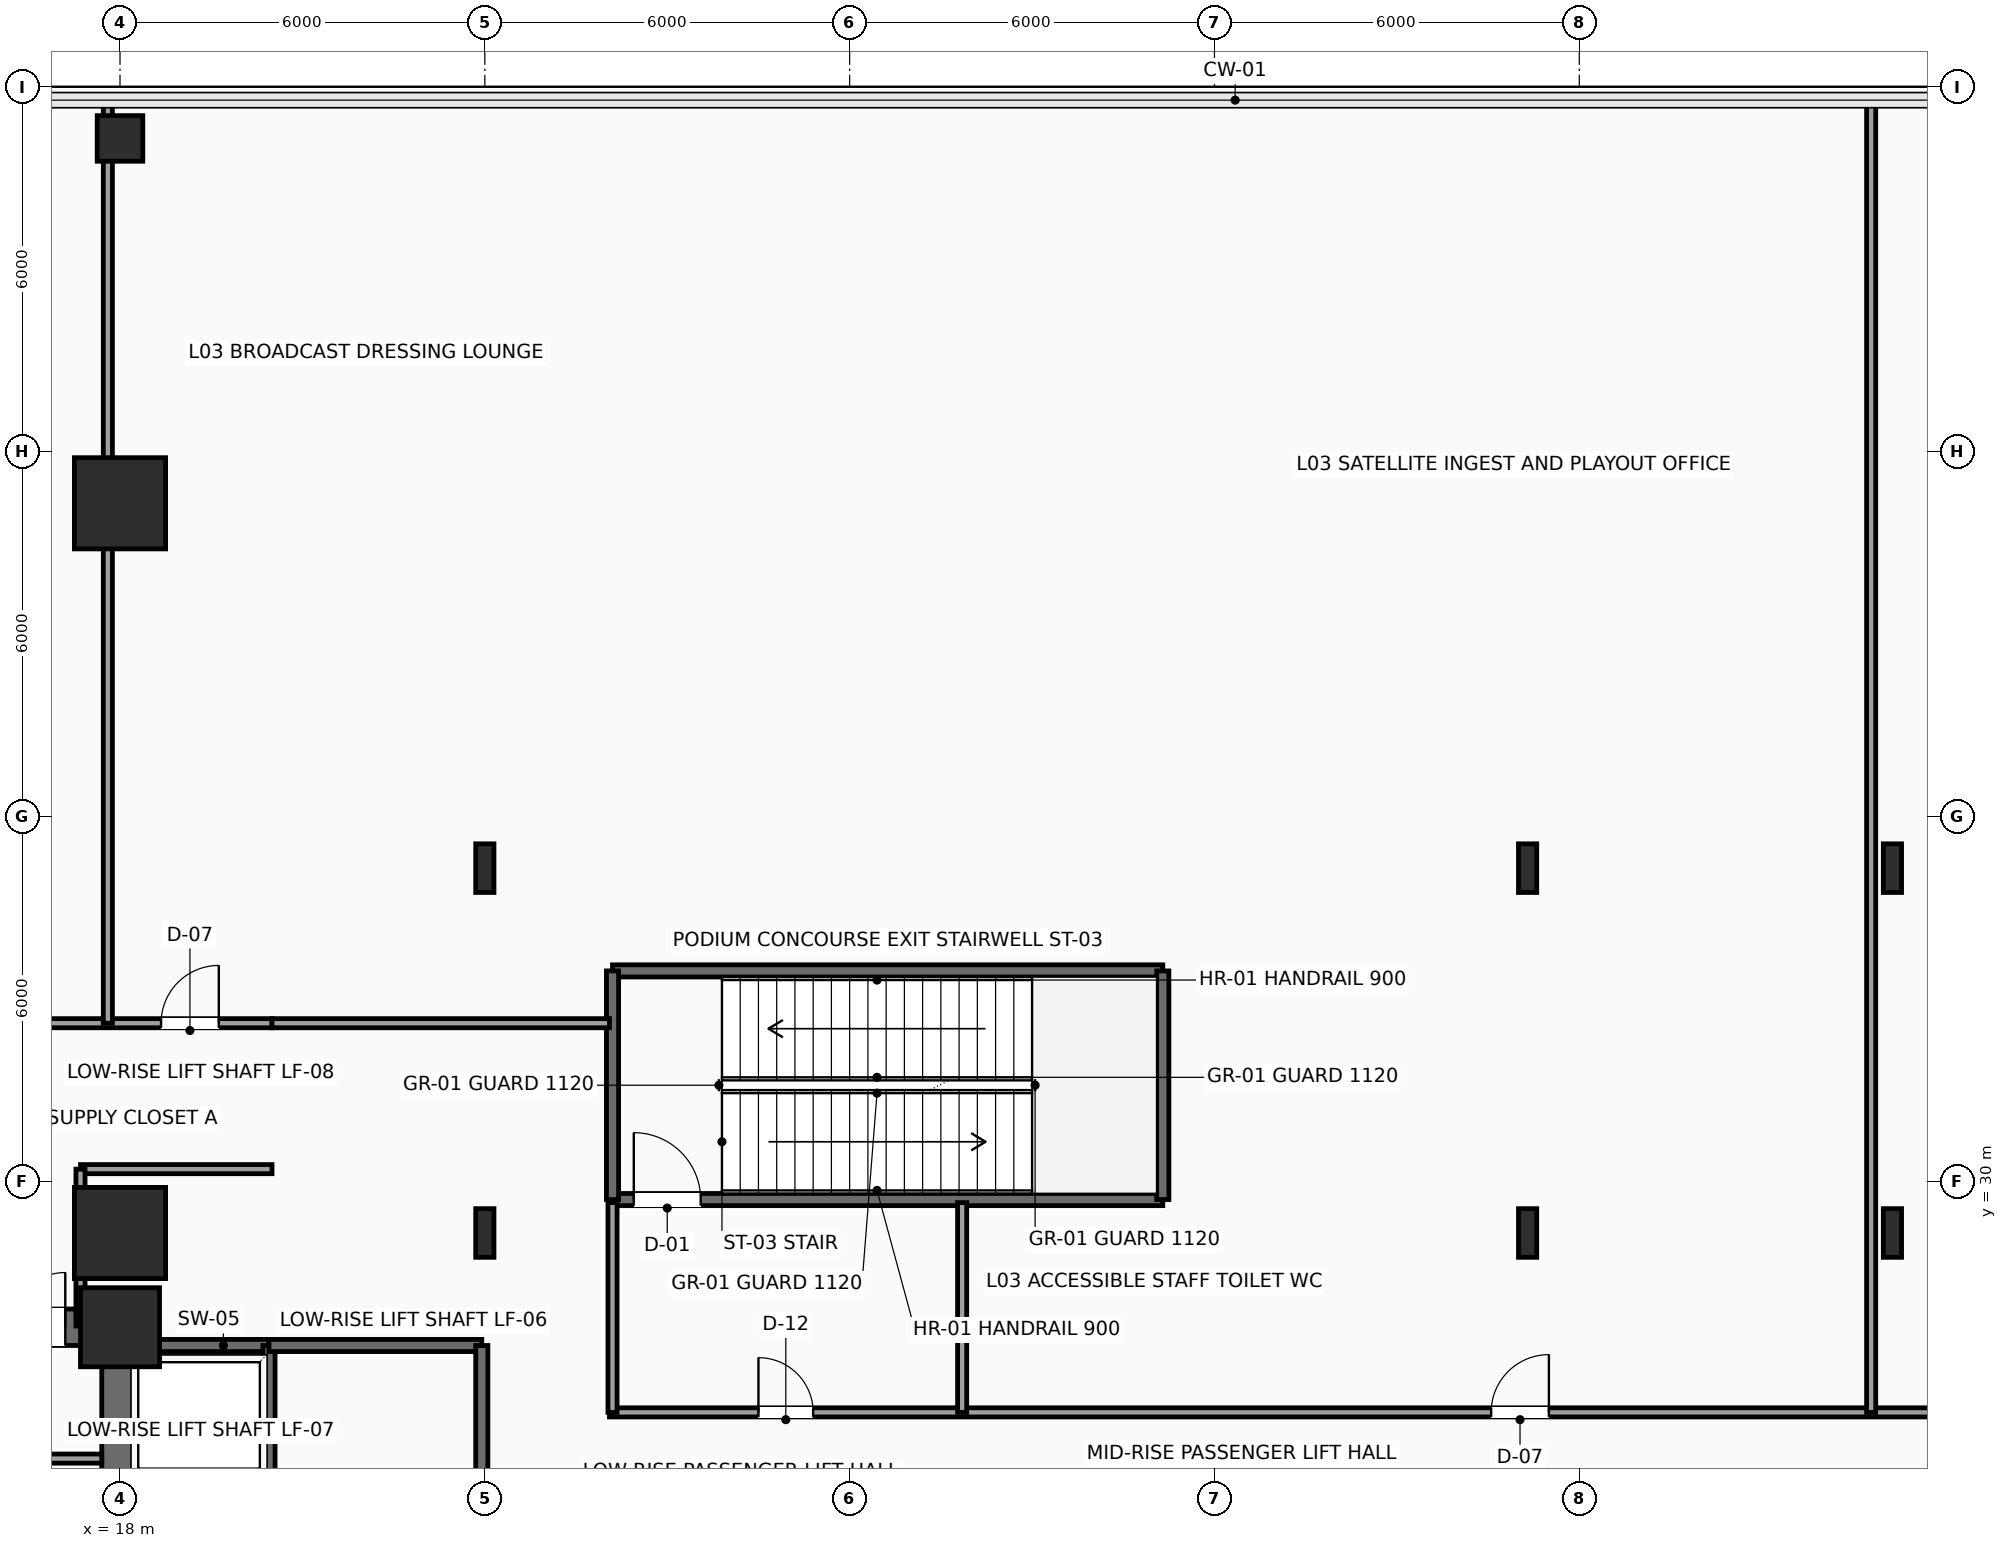
"""IFC4 building model, lengths in metres.
Left out: names, types, materials, properties, quantities, classifications, styles, units other than length and angle.
Written with IfcOpenShell. Run it as: python <this file> out.ifc"""

import sys

from ifc_helpers import new_model, si_unit, direction, frame, frame_2d, origin, origin_2d, place, context, subcontext, project, spatial, rectangle, hollow_rectangle, i_section, extrude, element, fill, save


model = new_model("IFC4")
c1 = context("Model", 3, precision=1e-05, world=origin(), true_north=direction((0.0, 1.0)))
c2 = subcontext(c1, "Body", "Model", "MODEL_VIEW")
j1 = project(units=[si_unit("LENGTHUNIT", "METRE"), si_unit("PLANEANGLEUNIT", "RADIAN")], contexts=[c1])
p1 = place(None, origin())
s1 = spatial("IfcSite", under=j1, at=p1, CompositionType="ELEMENT")
p2 = place(p1, origin())
s2 = spatial("IfcBuilding", under=s1, at=p2, CompositionType="ELEMENT")
p3 = place(p2, frame((0.0, 0.0, 16.5)))
s3 = spatial("IfcBuildingStorey", under=s2, at=p3, CompositionType="ELEMENT", Elevation=16.5)
p4 = place(p3, frame((18.0, 27.6, 0.0), z_axis=(0.0, 0.0, 1.0), x_axis=(1.0, 0.0, 0.0)))
e1 = element("IfcColumn", 1, at=p4, inside=s3, PredefinedType="COLUMN", context=c2, shape_type="SweptSolid", body=[
    extrude(rectangle(XDim=1.3, YDim=1.3, at=origin_2d()), origin(), (0.0, 0.0, 1.0), 5.4),
])
for number, where, z_axis, x_axis in (
    (2, (18.0, 29.15, 0.0), (0.0, 0.0, 1.0), (1.0, 0.0, 0.0)),
    (3, (18.0, 41.15, 0.0), (0.0, 0.0, 1.0), (1.0, 0.0, 0.0)),
):
    element("IfcColumn", number, at=place(p3, frame(where, z_axis=z_axis, x_axis=x_axis)), inside=s3, PredefinedType="COLUMN", context=c2, shape_type="SweptSolid", body=[
        extrude(rectangle(XDim=1.5, YDim=1.5, at=origin_2d()), origin(), (0.0, 0.0, 1.0), 5.4),
    ])
p5 = place(p3, frame((18.0, 47.15, 0.0), z_axis=(0.0, 0.0, 1.0), x_axis=(1.0, 0.0, 0.0)))
e4 = element("IfcColumn", 4, at=p5, inside=s3, PredefinedType="COLUMN", context=c2, shape_type="SweptSolid", body=[
    extrude(hollow_rectangle(XDim=0.75, YDim=0.75, WallThickness=0.035, InnerFilletRadius=0.035, OuterFilletRadius=0.05, at=origin_2d()), origin(), (0.0, 0.0, 1.0), 5.4),
])
for number, where, z_axis, x_axis in (
    (5, (24.0, 29.15, 0.0), (0.0, 0.0, 1.0), (1.0, 0.0, 0.0)),
    (6, (24.0, 35.15, 0.0), (0.0, 0.0, 1.0), (1.0, 0.0, 0.0)),
    (7, (41.15, 29.15, 0.0), (0.0, 0.0, 1.0), (1.0, 0.0, 0.0)),
    (8, (41.15, 35.15, 0.0), (0.0, 0.0, 1.0), (1.0, 0.0, 0.0)),
    (9, (47.15, 29.15, 0.0), (0.0, 0.0, 1.0), (1.0, 0.0, 0.0)),
    (10, (47.15, 35.15, 0.0), (0.0, 0.0, 1.0), (1.0, 0.0, 0.0)),
):
    element("IfcColumn", number, at=place(p3, frame(where, z_axis=z_axis, x_axis=x_axis)), inside=s3, PredefinedType="COLUMN", context=c2, shape_type="SweptSolid", body=[
        extrude(i_section(OverallWidth=0.3, OverallDepth=0.8, WebThickness=0.018, FlangeThickness=0.033, FilletRadius=0.03, at=origin_2d()), origin(), (0.0, 0.0, 1.0), 5.4),
    ])
p6 = place(p3, frame((6.0, 27.6, 0.0), z_axis=(0.0, 0.0, 1.0), x_axis=(1.0, 0.0, 0.0)))
e11 = element("IfcWall", 11, at=p6, inside=s3, PredefinedType="SHEAR", context=c2, shape_type="SweptSolid", body=[
    extrude(rectangle(XDim=12.0, YDim=0.6, at=frame_2d((6.0, 0.0))), origin(), (0.0, 0.0, 1.0), 5.125),
])
p7 = place(p6, frame((10.2, 0.0, 0.0)))
e12 = element("IfcOpeningElement", 12, at=p7, cuts=e11, PredefinedType="OPENING", context=c2, shape_type="SweptSolid", body=[
    extrude(rectangle(XDim=0.9, YDim=2.15, at=frame_2d((0.45, 1.075))), frame((0.0, 0.31, 0.0), z_axis=(0.0, -1.0, 0.0), x_axis=(1.0, 0.0, 0.0)), (0.0, 0.0, 1.0), 0.62),
])
p8 = place(p3, frame((18.0, 18.0, 0.0), z_axis=(0.0, 0.0, 1.0), x_axis=(0.0, 1.0, 0.0)))
e13 = element("IfcWall", 13, at=p8, inside=s3, PredefinedType="SHEAR", context=c2, shape_type="SweptSolid", body=[
    extrude(rectangle(XDim=9.6, YDim=0.6, at=frame_2d((4.8, 0.0))), origin(), (0.0, 0.0, 1.0), 5.125),
])
p9 = place(p3, frame((15.28, 25.44, 0.0), z_axis=(0.0, 0.0, 1.0), x_axis=(1.0, 0.0, 0.0)))
e14 = element("IfcWall", 14, at=p9, inside=s3, PredefinedType="PARTITIONING", context=c2, shape_type="SweptSolid", body=[
    extrude(rectangle(XDim=2.42, YDim=0.15, at=frame_2d((1.21, 0.0))), origin(), (0.0, 0.0, 1.0), 5.125),
])
p10 = place(p9, frame((0.65, 0.0, 0.0)))
e15 = element("IfcOpeningElement", 15, at=p10, cuts=e14, PredefinedType="OPENING", context=c2, shape_type="SweptSolid", body=[
    extrude(rectangle(XDim=0.9, YDim=2.15, at=frame_2d((0.45, 1.075))), frame((0.0, 0.085, 0.0), z_axis=(0.0, -1.0, 0.0), x_axis=(1.0, 0.0, 0.0)), (0.0, 0.0, 1.0), 0.17),
])
p11 = place(p3, frame((18.1, 27.3, 0.0), z_axis=(0.0, 0.0, 1.0), x_axis=(1.0, 0.0, 0.0)))
e16 = element("IfcWall", 16, at=p11, inside=s3, PredefinedType="SHEAR", context=c2, shape_type="SweptSolid", body=[
    extrude(rectangle(XDim=2.35, YDim=0.2, at=frame_2d((1.175, 0.0))), origin(), (0.0, 0.0, 1.0), 5.125),
])
p12 = place(p3, frame((20.45, 18.25, 0.0), z_axis=(0.0, 0.0, 1.0), x_axis=(0.0, 1.0, 0.0)))
e17 = element("IfcWall", 17, at=p12, inside=s3, PredefinedType="SHEAR", context=c2, shape_type="SweptSolid", body=[
    extrude(rectangle(XDim=9.05, YDim=0.2, at=frame_2d((4.525, 0.0))), origin(), (0.0, 0.0, 1.0), 5.125),
])
p13 = place(p3, frame((20.45, 27.3, 0.0), z_axis=(0.0, 0.0, 1.0), x_axis=(1.0, 0.0, 0.0)))
e18 = element("IfcWall", 18, at=p13, inside=s3, PredefinedType="SHEAR", context=c2, shape_type="SweptSolid", body=[
    extrude(rectangle(XDim=3.5, YDim=0.2, at=frame_2d((1.75, 0.0))), origin(), (0.0, 0.0, 1.0), 5.125),
])
p14 = place(p3, frame((23.95, 18.0, 0.0), z_axis=(0.0, 0.0, 1.0), x_axis=(0.0, 1.0, 0.0)))
e19 = element("IfcWall", 19, at=p14, inside=s3, PredefinedType="SHEAR", context=c2, shape_type="SweptSolid", body=[
    extrude(rectangle(XDim=9.3, YDim=0.2, at=frame_2d((4.65, 0.0))), origin(), (0.0, 0.0, 1.0), 5.125),
])
p15 = place(p3, frame((26.1, 29.7, 0.0), z_axis=(0.0, 0.0, 1.0), x_axis=(1.0, 0.0, 0.0)))
e20 = element("IfcWall", 20, at=p15, inside=s3, PredefinedType="SHEAR", context=c2, shape_type="SweptSolid", body=[
    extrude(rectangle(XDim=9.05, YDim=0.2, at=frame_2d((4.525, 0.0))), origin(), (0.0, 0.0, 1.0), 5.125),
])
p16 = place(p15, frame((0.35, 0.0, 0.0)))
e21 = element("IfcOpeningElement", 21, at=p16, cuts=e20, PredefinedType="OPENING", context=c2, shape_type="SweptSolid", body=[
    extrude(rectangle(XDim=1.1, YDim=2.2, at=frame_2d((0.55, 1.1))), frame((0.0, 0.11, 0.0), z_axis=(0.0, -1.0, 0.0), x_axis=(1.0, 0.0, 0.0)), (0.0, 0.0, 1.0), 0.22),
])
p17 = place(p3, frame((26.1, 33.46, 0.0), z_axis=(0.0, 0.0, 1.0), x_axis=(1.0, 0.0, 0.0)))
e22 = element("IfcWall", 22, at=p17, inside=s3, PredefinedType="SHEAR", context=c2, shape_type="SweptSolid", body=[
    extrude(rectangle(XDim=9.05, YDim=0.2, at=frame_2d((4.525, 0.0))), origin(), (0.0, 0.0, 1.0), 5.125),
])
for number, where, z_axis, x_axis in (
    (23, (26.1, 29.7, 0.0), (0.0, 0.0, 1.0), (0.0, 1.0, 0.0)),
    (24, (35.15, 29.7, 0.0), (0.0, 0.0, 1.0), (0.0, 1.0, 0.0)),
):
    element("IfcWall", number, at=place(p3, frame(where, z_axis=z_axis, x_axis=x_axis)), inside=s3, PredefinedType="SHEAR", context=c2, shape_type="SweptSolid", body=[
        extrude(rectangle(XDim=3.76, YDim=0.2, at=frame_2d((1.88, 0.0))), origin(), (0.0, 0.0, 1.0), 5.125),
    ])
p18 = place(p3, frame((20.5, 30.2, 0.0), z_axis=(0.0, 0.0, 1.0), x_axis=(-1.0, 0.0, 0.0)))
e25 = element("IfcWall", 25, at=p18, inside=s3, PredefinedType="PARTITIONING", context=c2, shape_type="SweptSolid", body=[
    extrude(rectangle(XDim=3.15, YDim=0.15, at=frame_2d((1.575, 0.0))), origin(), (0.0, 0.0, 1.0), 5.125),
])
p19 = place(p3, frame((17.35, 30.2, 0.0), z_axis=(0.0, 0.0, 1.0), x_axis=(0.0, -1.0, 0.0)))
e26 = element("IfcWall", 26, at=p19, inside=s3, PredefinedType="PARTITIONING", context=c2, shape_type="SweptSolid", body=[
    extrude(rectangle(XDim=2.58, YDim=0.15, at=frame_2d((1.29, 0.0))), origin(), (0.0, 0.0, 1.0), 5.125),
])
p20 = place(p3, frame((5.9, 32.6, 0.0), z_axis=(0.0, 0.0, 1.0), x_axis=(1.0, 0.0, 0.0)))
e27 = element("IfcWall", 27, at=p20, inside=s3, PredefinedType="PARTITIONING", context=c2, shape_type="SweptSolid", body=[
    extrude(rectangle(XDim=14.6, YDim=0.15, at=frame_2d((7.3, 0.0))), origin(), (0.0, 0.0, 1.0), 5.125),
])
p21 = place(p20, frame((1.175, 0.0, 0.0)))
e28 = element("IfcOpeningElement", 28, at=p21, cuts=e27, PredefinedType="OPENING", context=c2, shape_type="SweptSolid", body=[
    extrude(rectangle(XDim=0.95, YDim=2.15, at=frame_2d((0.475, 1.075))), frame((0.0, 0.085, 0.0), z_axis=(0.0, -1.0, 0.0), x_axis=(1.0, 0.0, 0.0)), (0.0, 0.0, 1.0), 0.17),
])
p22 = place(p20, frame((7.125, 0.0, 0.0)))
e29 = element("IfcOpeningElement", 29, at=p22, cuts=e27, PredefinedType="OPENING", context=c2, shape_type="SweptSolid", body=[
    extrude(rectangle(XDim=0.95, YDim=2.15, at=frame_2d((0.475, 1.075))), frame((0.0, 0.085, 0.0), z_axis=(0.0, -1.0, 0.0), x_axis=(1.0, 0.0, 0.0)), (0.0, 0.0, 1.0), 0.17),
])
p23 = place(p20, frame((12.775, 0.0, 0.0)))
e30 = element("IfcOpeningElement", 30, at=p23, cuts=e27, PredefinedType="OPENING", context=c2, shape_type="SweptSolid", body=[
    extrude(rectangle(XDim=0.95, YDim=2.15, at=frame_2d((0.475, 1.075))), frame((0.0, 0.085, 0.0), z_axis=(0.0, -1.0, 0.0), x_axis=(1.0, 0.0, 0.0)), (0.0, 0.0, 1.0), 0.17),
])
p24 = place(p3, frame((20.5, 32.6, 0.0), z_axis=(0.0, 0.0, 1.0), x_axis=(1.0, 0.0, 0.0)))
e31 = element("IfcWall", 31, at=p24, inside=s3, PredefinedType="PARTITIONING", context=c2, shape_type="SweptSolid", body=[
    extrude(rectangle(XDim=5.55, YDim=0.15, at=frame_2d((2.775, 0.0))), origin(), (0.0, 0.0, 1.0), 5.125),
])
p25 = place(p3, frame((26.05, 26.2, 0.0), z_axis=(0.0, 0.0, 1.0), x_axis=(1.0, 0.0, 0.0)))
e32 = element("IfcWall", 32, at=p25, inside=s3, PredefinedType="PARTITIONING", context=c2, shape_type="SweptSolid", body=[
    extrude(rectangle(XDim=33.55, YDim=0.15, at=frame_2d((16.775, 0.0))), origin(), (0.0, 0.0, 1.0), 5.125),
])
p26 = place(p25, frame((2.45, 0.0, 0.0)))
e33 = element("IfcOpeningElement", 33, at=p26, cuts=e32, PredefinedType="OPENING", context=c2, shape_type="SweptSolid", body=[
    extrude(rectangle(XDim=0.9, YDim=2.1, at=frame_2d((0.45, 1.05))), frame((0.0, 0.085, 0.0), z_axis=(0.0, -1.0, 0.0), x_axis=(1.0, 0.0, 0.0)), (0.0, 0.0, 1.0), 0.17),
])
p27 = place(p25, frame((14.5, 0.0, 0.0)))
e34 = element("IfcOpeningElement", 34, at=p27, cuts=e32, PredefinedType="OPENING", context=c2, shape_type="SweptSolid", body=[
    extrude(rectangle(XDim=0.95, YDim=2.15, at=frame_2d((0.475, 1.075))), frame((0.0, 0.085, 0.0), z_axis=(0.0, -1.0, 0.0), x_axis=(1.0, 0.0, 0.0)), (0.0, 0.0, 1.0), 0.17),
])
p28 = place(p25, frame((24.275, 0.0, 0.0)))
e35 = element("IfcOpeningElement", 35, at=p28, cuts=e32, PredefinedType="OPENING", context=c2, shape_type="SweptSolid", body=[
    extrude(rectangle(XDim=0.95, YDim=2.15, at=frame_2d((0.475, 1.075))), frame((0.0, 0.085, 0.0), z_axis=(0.0, -1.0, 0.0), x_axis=(1.0, 0.0, 0.0)), (0.0, 0.0, 1.0), 0.17),
])
p29 = place(p25, frame((30.675, 0.0, 0.0)))
e36 = element("IfcOpeningElement", 36, at=p29, cuts=e32, PredefinedType="OPENING", context=c2, shape_type="SweptSolid", body=[
    extrude(rectangle(XDim=0.95, YDim=2.15, at=frame_2d((0.475, 1.075))), frame((0.0, 0.085, 0.0), z_axis=(0.0, -1.0, 0.0), x_axis=(1.0, 0.0, 0.0)), (0.0, 0.0, 1.0), 0.17),
])
for number, where, z_axis, x_axis in (
    (37, (26.1, 26.2, 0.0), (0.0, 0.0, 1.0), (0.0, 1.0, 0.0)),
    (38, (31.85, 26.2, 0.0), (0.0, 0.0, 1.0), (0.0, 1.0, 0.0)),
):
    element("IfcWall", number, at=place(p3, frame(where, z_axis=z_axis, x_axis=x_axis)), inside=s3, PredefinedType="PARTITIONING", context=c2, shape_type="SweptSolid", body=[
        extrude(rectangle(XDim=3.45, YDim=0.15, at=frame_2d((1.725, 0.0))), origin(), (0.0, 0.0, 1.0), 5.125),
    ])
p30 = place(p3, frame((46.8, 26.2, 0.0), z_axis=(0.0, 0.0, 1.0), x_axis=(0.0, 1.0, 0.0)))
e39 = element("IfcWall", 39, at=p30, inside=s3, PredefinedType="PARTITIONING", context=c2, shape_type="SweptSolid", body=[
    extrude(rectangle(XDim=21.58, YDim=0.15, at=frame_2d((10.79, 0.0))), origin(), (0.0, 0.0, 1.0), 5.125),
])
p31 = place(p3, frame((17.8, 32.6, 0.0), z_axis=(0.0, 0.0, 1.0), x_axis=(0.0, 1.0, 0.0)))
e40 = element("IfcWall", 40, at=p31, inside=s3, PredefinedType="PARTITIONING", context=c2, shape_type="SweptSolid", body=[
    extrude(rectangle(XDim=15.18, YDim=0.15, at=frame_2d((7.59, 0.0))), origin(), (0.0, 0.0, 1.0), 4.217),
])
p32 = place(p7, origin())
e41 = element("IfcDoor", 41, at=p32, inside=s3, OperationType="SINGLE_SWING_RIGHT", PredefinedType="DOOR", context=c2, shape_type="SweptSolid", body=[
    extrude(rectangle(XDim=0.9, YDim=2.15, at=frame_2d((0.45, 1.075))), frame((0.0, 0.025, 0.0), z_axis=(0.0, -1.0, 0.0), x_axis=(1.0, 0.0, 0.0)), (0.0, 0.0, 1.0), 0.05),
])
fill(e12, e41)
p33 = place(p16, origin())
e42 = element("IfcDoor", 42, at=p33, inside=s3, OperationType="SINGLE_SWING_LEFT", PredefinedType="DOOR", context=c2, shape_type="SweptSolid", body=[
    extrude(rectangle(XDim=1.1, YDim=2.2, at=frame_2d((0.55, 1.1))), frame((0.0, 0.025, 0.0), z_axis=(0.0, -1.0, 0.0), x_axis=(1.0, 0.0, 0.0)), (0.0, 0.0, 1.0), 0.05),
])
fill(e21, e42)
p34 = place(p23, origin())
e43 = element("IfcDoor", 43, at=p34, inside=s3, OperationType="SINGLE_SWING_RIGHT", PredefinedType="DOOR", context=c2, shape_type="SweptSolid", body=[
    extrude(rectangle(XDim=0.95, YDim=2.15, at=frame_2d((0.475, 1.075))), frame((0.0, 0.025, 0.0), z_axis=(0.0, -1.0, 0.0), x_axis=(1.0, 0.0, 0.0)), (0.0, 0.0, 1.0), 0.05),
])
fill(e30, e43)
p35 = place(p26, origin())
e44 = element("IfcDoor", 44, at=p35, inside=s3, OperationType="SINGLE_SWING_LEFT", PredefinedType="DOOR", context=c2, shape_type="SweptSolid", body=[
    extrude(rectangle(XDim=0.9, YDim=2.1, at=frame_2d((0.45, 1.05))), frame((0.0, 0.025, 0.0), z_axis=(0.0, -1.0, 0.0), x_axis=(1.0, 0.0, 0.0)), (0.0, 0.0, 1.0), 0.05),
])
fill(e33, e44)
p36 = place(p27, origin())
e45 = element("IfcDoor", 45, at=p36, inside=s3, OperationType="SINGLE_SWING_RIGHT", PredefinedType="DOOR", context=c2, shape_type="SweptSolid", body=[
    extrude(rectangle(XDim=0.95, YDim=2.15, at=frame_2d((0.475, 1.075))), frame((0.0, 0.025, 0.0), z_axis=(0.0, -1.0, 0.0), x_axis=(1.0, 0.0, 0.0)), (0.0, 0.0, 1.0), 0.05),
])
fill(e34, e45)
save(model, sys.argv[1])
